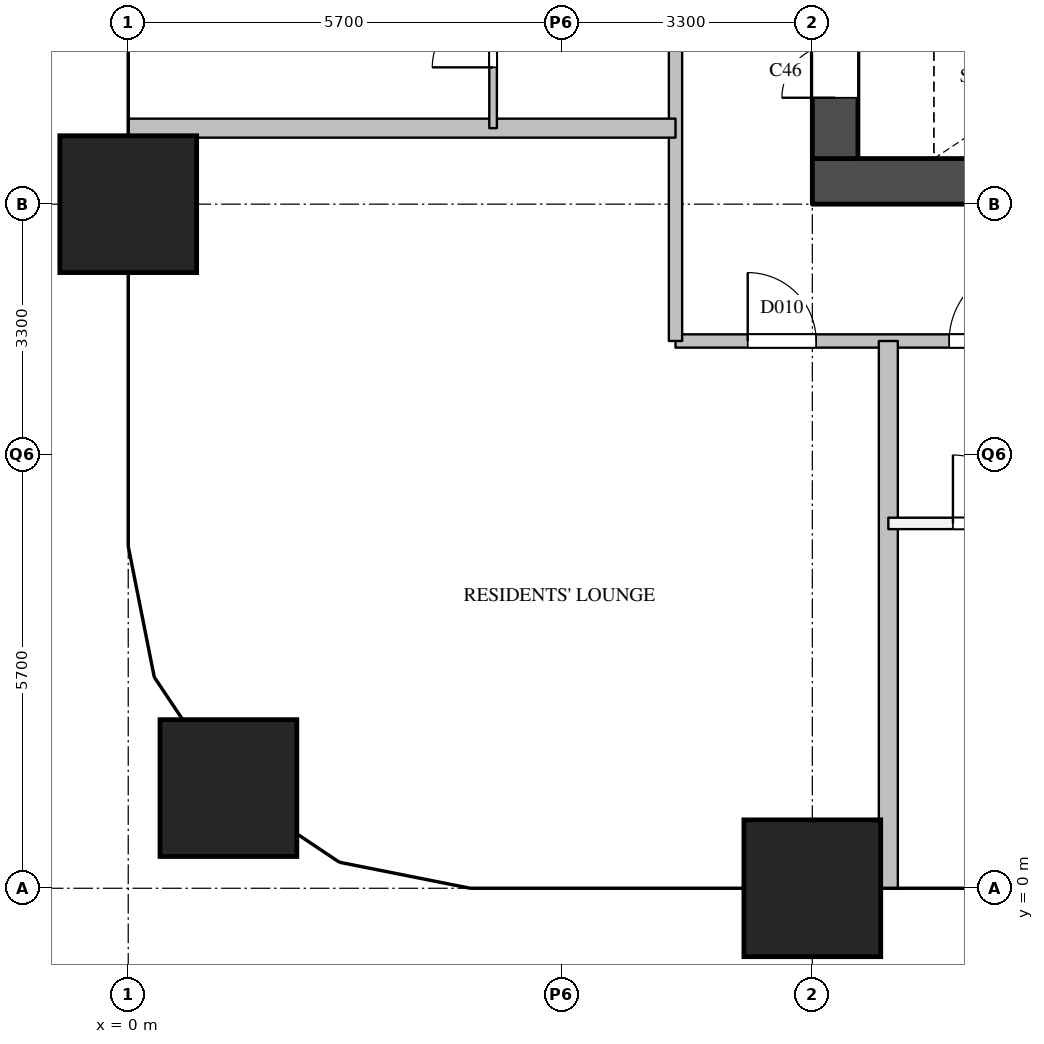
"""IFC4 building model, lengths in metres.
Left out: names, types, materials, properties, quantities, classifications, styles, units other than length and angle.
Written with IfcOpenShell. Run it as: python <this file> out.ifc"""

import sys

from ifc_helpers import new_model, si_unit, direction, frame, frame_2d, origin, origin_2d, place, context, subcontext, project, spatial, rectangle, extrude, element, fill, save


model = new_model("IFC4")
c1 = context("Model", 3, precision=1e-05, world=origin(), true_north=direction((0.0, 1.0)))
c2 = subcontext(c1, "Body", "Model", "MODEL_VIEW")
j1 = project(units=[si_unit("LENGTHUNIT", "METRE"), si_unit("PLANEANGLEUNIT", "RADIAN")], contexts=[c1])
p1 = place(None, origin())
s1 = spatial("IfcSite", under=j1, at=p1, CompositionType="ELEMENT")
p2 = place(p1, origin())
s2 = spatial("IfcBuilding", under=s1, at=p2, CompositionType="ELEMENT")
p3 = place(p2, frame((0.0, 0.0, 72.8)))
s3 = spatial("IfcBuildingStorey", under=s2, at=p3, CompositionType="ELEMENT", Elevation=72.8)
for number, where, z_axis, x_axis in (
    (1, (1.318, 1.318, 0.0), (0.0, 0.0, 1.0), (1.0, 0.0, 0.0)),
    (2, (0.0, 9.0, 0.0), (0.0, 0.0, 1.0), (1.0, 0.0, 0.0)),
    (3, (9.0, 0.0, 0.0), (0.0, 0.0, 1.0), (1.0, 0.0, 0.0)),
):
    element("IfcColumn", number, at=place(p3, frame(where, z_axis=z_axis, x_axis=x_axis)), inside=s3, PredefinedType="COLUMN", context=c2, shape_type="SweptSolid", body=[
        extrude(rectangle(XDim=1.8, YDim=1.8, at=origin_2d()), origin(), (0.0, 0.0, 1.0), 5.0),
    ])
p4 = place(p3, frame((9.0, 9.3, 0.0), z_axis=(0.0, 0.0, 1.0), x_axis=(1.0, 0.0, 0.0)))
e4 = element("IfcWall", 4, at=p4, inside=s3, PredefinedType="SHEAR", context=c2, shape_type="SweptSolid", body=[
    extrude(rectangle(XDim=9.0, YDim=0.6, at=frame_2d((4.5, 0.0))), origin(), (0.0, 0.0, 1.0), 4.7),
])
p5 = place(p3, frame((9.3, 9.6, 0.0), z_axis=(0.0, 0.0, 1.0), x_axis=(0.0, 1.0, 0.0)))
e5 = element("IfcWall", 5, at=p5, inside=s3, PredefinedType="SHEAR", context=c2, shape_type="SweptSolid", body=[
    extrude(rectangle(XDim=12.3, YDim=0.6, at=frame_2d((6.15, 0.0))), origin(), (0.0, 0.0, 1.0), 4.7),
])
p6 = place(p5, frame((0.8, 0.0, 0.0)))
e6 = element("IfcOpeningElement", 6, at=p6, cuts=e5, PredefinedType="OPENING", context=c2, shape_type="SweptSolid", body=[
    extrude(rectangle(XDim=0.7, YDim=2.1, at=frame_2d((0.35, 1.05))), frame((0.0, 0.31, 0.0), z_axis=(0.0, -1.0, 0.0), x_axis=(1.0, 0.0, 0.0)), (0.0, 0.0, 1.0), 0.62),
])
p7 = place(p5, frame((4.8, 0.0, 0.0)))
e7 = element("IfcOpeningElement", 7, at=p7, cuts=e5, PredefinedType="OPENING", context=c2, shape_type="SweptSolid", body=[
    extrude(rectangle(XDim=1.0, YDim=2.1, at=frame_2d((0.5, 1.05))), frame((0.0, 0.31, 0.0), z_axis=(0.0, -1.0, 0.0), x_axis=(1.0, 0.0, 0.0)), (0.0, 0.0, 1.0), 0.62),
])
p8 = place(p3, frame((7.2, 7.2, 0.0), z_axis=(0.0, 0.0, 1.0), x_axis=(1.0, 0.0, 0.0)))
e8 = element("IfcWall", 8, at=p8, inside=s3, PredefinedType="PARTITIONING", context=c2, shape_type="SweptSolid", body=[
    extrude(rectangle(XDim=12.6, YDim=0.175, at=frame_2d((6.3, 0.0))), origin(), (0.0, 0.0, 1.0), 4.7),
])
p9 = place(p8, frame((3.6, 0.0, 0.0)))
e9 = element("IfcOpeningElement", 9, at=p9, cuts=e8, PredefinedType="OPENING", context=c2, shape_type="SweptSolid", body=[
    extrude(rectangle(XDim=1.0, YDim=2.1, at=frame_2d((0.5, 1.05))), frame((0.0, 0.097, 0.0), z_axis=(0.0, -1.0, 0.0), x_axis=(1.0, 0.0, 0.0)), (0.0, 0.0, 1.0), 0.195),
])
p10 = place(p8, frame((0.95, 0.0, 0.0)))
e10 = element("IfcOpeningElement", 10, at=p10, cuts=e8, PredefinedType="OPENING", context=c2, shape_type="SweptSolid", body=[
    extrude(rectangle(XDim=0.9, YDim=2.1, at=frame_2d((0.45, 1.05))), frame((0.0, 0.097, 0.0), z_axis=(0.0, -1.0, 0.0), x_axis=(1.0, 0.0, 0.0)), (0.0, 0.0, 1.0), 0.195),
])
p11 = place(p3, frame((7.2, 7.2, 0.0), z_axis=(0.0, 0.0, 1.0), x_axis=(0.0, 1.0, 0.0)))
e11 = element("IfcWall", 11, at=p11, inside=s3, PredefinedType="PARTITIONING", context=c2, shape_type="SweptSolid", body=[
    extrude(rectangle(XDim=16.49, YDim=0.175, at=frame_2d((8.245, 0.0))), origin(), (0.0, 0.0, 1.0), 4.7),
])
p12 = place(p11, frame((8.5, 0.0, 0.0)))
e12 = element("IfcOpeningElement", 12, at=p12, cuts=e11, PredefinedType="OPENING", context=c2, shape_type="SweptSolid", body=[
    extrude(rectangle(XDim=1.0, YDim=2.1, at=frame_2d((0.5, 1.05))), frame((0.0, 0.097, 0.0), z_axis=(0.0, -1.0, 0.0), x_axis=(1.0, 0.0, 0.0)), (0.0, 0.0, 1.0), 0.195),
])
p13 = place(p11, frame((14.195, 0.0, 0.0)))
e13 = element("IfcOpeningElement", 13, at=p13, cuts=e11, PredefinedType="OPENING", context=c2, shape_type="SweptSolid", body=[
    extrude(rectangle(XDim=0.9, YDim=2.1, at=frame_2d((0.45, 1.05))), frame((0.0, 0.097, 0.0), z_axis=(0.0, -1.0, 0.0), x_axis=(1.0, 0.0, 0.0)), (0.0, 0.0, 1.0), 0.195),
])
p14 = place(p3, frame((10.0, 4.8, 0.0), z_axis=(0.0, 0.0, 1.0), x_axis=(1.0, 0.0, 0.0)))
e14 = element("IfcWall", 14, at=p14, inside=s3, PredefinedType="PARTITIONING", context=c2, shape_type="SweptSolid", body=[
    extrude(rectangle(XDim=2.6, YDim=0.15, at=frame_2d((1.3, 0.0))), origin(), (0.0, 0.0, 1.0), 4.7),
])
p15 = place(p14, frame((0.85, 0.0, 0.0)))
e15 = element("IfcOpeningElement", 15, at=p15, cuts=e14, PredefinedType="OPENING", context=c2, shape_type="SweptSolid", body=[
    extrude(rectangle(XDim=0.9, YDim=2.1, at=frame_2d((0.45, 1.05))), frame((0.0, 0.085, 0.0), z_axis=(0.0, -1.0, 0.0), x_axis=(1.0, 0.0, 0.0)), (0.0, 0.0, 1.0), 0.17),
])
for number, where, z_axis, x_axis in (
    (16, (0.0, 10.0, 0.0), (0.0, 0.0, 1.0), (1.0, 0.0, 0.0)),
    (17, (10.0, 0.0, 0.0), (0.0, 0.0, 1.0), (0.0, 1.0, 0.0)),
):
    element("IfcWall", number, at=place(p3, frame(where, z_axis=z_axis, x_axis=x_axis)), inside=s3, PredefinedType="PARTITIONING", context=c2, shape_type="SweptSolid", body=[
        extrude(rectangle(XDim=7.2, YDim=0.25, at=frame_2d((3.6, 0.0))), origin(), (0.0, 0.0, 1.0), 3.59),
    ])
p16 = place(p3, frame((4.8, 10.0, 0.0), z_axis=(0.0, 0.0, 1.0), x_axis=(0.0, 1.0, 0.0)))
e18 = element("IfcWall", 18, at=p16, inside=s3, PredefinedType="PARTITIONING", context=c2, shape_type="SweptSolid", body=[
    extrude(rectangle(XDim=2.4, YDim=0.1, at=frame_2d((1.2, 0.0))), origin(), (0.0, 0.0, 1.0), 4.7),
])
p17 = place(p16, frame((0.8, 0.0, 0.0)))
e19 = element("IfcOpeningElement", 19, at=p17, cuts=e18, PredefinedType="OPENING", context=c2, shape_type="SweptSolid", body=[
    extrude(rectangle(XDim=0.8, YDim=2.1, at=frame_2d((0.4, 1.05))), frame((0.0, 0.06, 0.0), z_axis=(0.0, -1.0, 0.0), x_axis=(1.0, 0.0, 0.0)), (0.0, 0.0, 1.0), 0.12),
])
p18 = place(p6, origin())
e20 = element("IfcDoor", 20, at=p18, inside=s3, OperationType="SINGLE_SWING_LEFT", PredefinedType="DOOR", context=c2, shape_type="SweptSolid", body=[
    extrude(rectangle(XDim=0.7, YDim=2.1, at=frame_2d((0.35, 1.05))), frame((0.0, 0.025, 0.0), z_axis=(0.0, -1.0, 0.0), x_axis=(1.0, 0.0, 0.0)), (0.0, 0.0, 1.0), 0.05),
])
fill(e6, e20)
p19 = place(p9, origin())
e21 = element("IfcDoor", 21, at=p19, inside=s3, OperationType="SINGLE_SWING_RIGHT", PredefinedType="DOOR", context=c2, shape_type="SweptSolid", body=[
    extrude(rectangle(XDim=1.0, YDim=2.1, at=frame_2d((0.5, 1.05))), frame((0.0, 0.025, 0.0), z_axis=(0.0, -1.0, 0.0), x_axis=(1.0, 0.0, 0.0)), (0.0, 0.0, 1.0), 0.05),
])
fill(e9, e21)
p20 = place(p15, origin())
e22 = element("IfcDoor", 22, at=p20, inside=s3, OperationType="SINGLE_SWING_LEFT", PredefinedType="DOOR", context=c2, shape_type="SweptSolid", body=[
    extrude(rectangle(XDim=0.9, YDim=2.1, at=frame_2d((0.45, 1.05))), frame((0.0, 0.025, 0.0), z_axis=(0.0, -1.0, 0.0), x_axis=(1.0, 0.0, 0.0)), (0.0, 0.0, 1.0), 0.05),
])
fill(e15, e22)
p21 = place(p10, origin())
e23 = element("IfcDoor", 23, at=p21, inside=s3, OperationType="SINGLE_SWING_LEFT", PredefinedType="DOOR", context=c2, shape_type="SweptSolid", body=[
    extrude(rectangle(XDim=0.9, YDim=2.1, at=frame_2d((0.45, 1.05))), frame((0.0, 0.025, 0.0), z_axis=(0.0, -1.0, 0.0), x_axis=(1.0, 0.0, 0.0)), (0.0, 0.0, 1.0), 0.05),
])
fill(e10, e23)
p22 = place(p17, origin())
e24 = element("IfcDoor", 24, at=p22, inside=s3, OperationType="SINGLE_SWING_LEFT", PredefinedType="DOOR", context=c2, shape_type="SweptSolid", body=[
    extrude(rectangle(XDim=0.8, YDim=2.1, at=frame_2d((0.4, 1.05))), frame((0.0, 0.025, 0.0), z_axis=(0.0, -1.0, 0.0), x_axis=(1.0, 0.0, 0.0)), (0.0, 0.0, 1.0), 0.05),
])
fill(e19, e24)
save(model, sys.argv[1])
